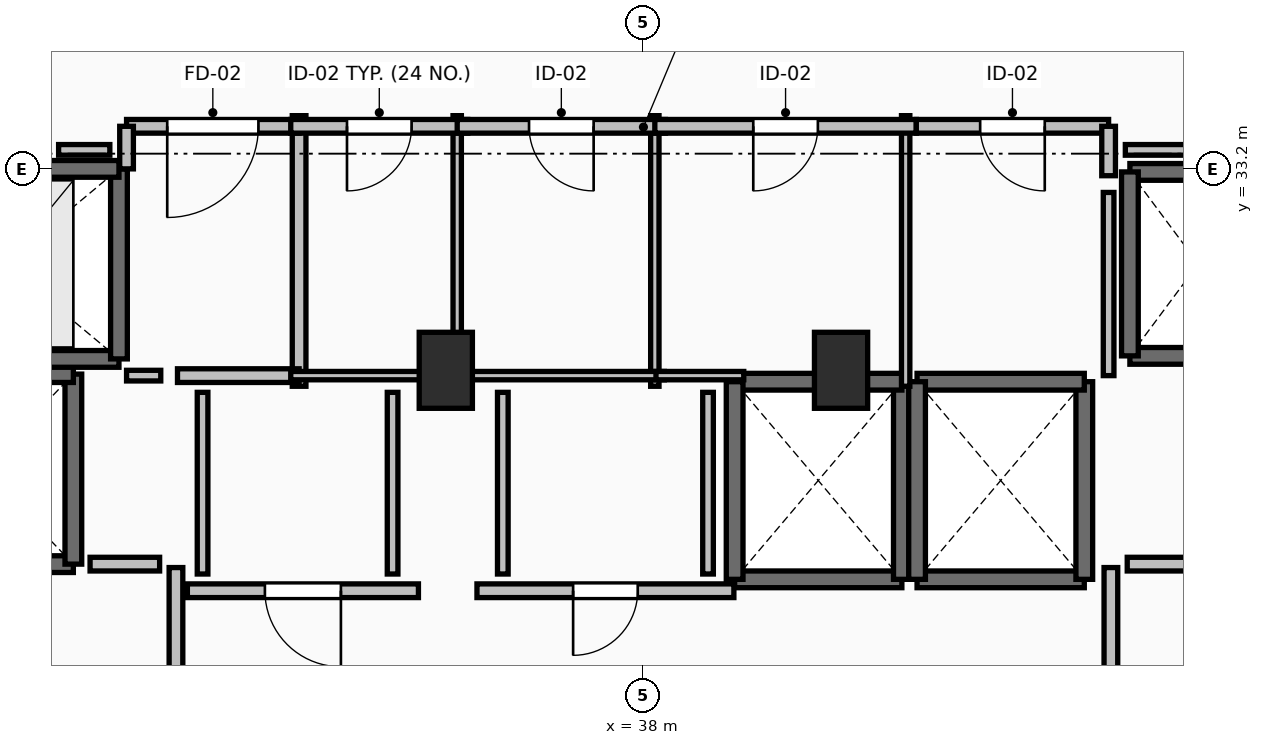
"""IFC4 building model, lengths in metres.
Left out: names, types, materials, properties, quantities, classifications, styles, units other than length and angle.
Written with IfcOpenShell. Run it as: python <this file> out.ifc"""

import sys

from ifc_helpers import new_model, si_unit, direction, frame, frame_2d, origin, origin_2d, place, context, subcontext, project, spatial, rectangle, extrude, element, fill, save


model = new_model("IFC4")
c1 = context("Model", 3, precision=1e-05, world=origin(), true_north=direction((0.0, 1.0)))
c2 = subcontext(c1, "Body", "Model", "MODEL_VIEW")
j1 = project(units=[si_unit("LENGTHUNIT", "METRE"), si_unit("PLANEANGLEUNIT", "RADIAN")], contexts=[c1])
p1 = place(None, origin())
s1 = spatial("IfcSite", under=j1, at=p1, CompositionType="ELEMENT")
p2 = place(p1, origin())
s2 = spatial("IfcBuilding", under=s1, at=p2, CompositionType="ELEMENT")
p3 = place(p2, frame((0.0, 0.0, 189.6)))
s3 = spatial("IfcBuildingStorey", under=s2, at=p3, CompositionType="ELEMENT", Elevation=189.6)
for number, where, z_axis, x_axis in (
    (1, (35.4, 30.55, 0.0), (0.0, 0.0, 1.0), (1.0, 0.0, 0.0)),
    (2, (40.6, 30.55, 0.0), (0.0, 0.0, 1.0), (1.0, 0.0, 0.0)),
):
    element("IfcColumn", number, at=place(p3, frame(where, z_axis=z_axis, x_axis=x_axis)), inside=s3, PredefinedType="PILASTER", context=c2, shape_type="SweptSolid", body=[
        extrude(rectangle(XDim=0.7, YDim=1.0, at=origin_2d()), origin(), (0.0, 0.0, 1.0), 3.5),
    ])
p4 = place(p3, frame((39.2, 27.8, 0.0), z_axis=(0.0, 0.0, 1.0), x_axis=(1.0, 0.0, 0.0)))
e3 = element("IfcWall", 3, at=p4, inside=s3, PredefinedType="SOLIDWALL", context=c2, shape_type="SweptSolid", body=[
    extrude(rectangle(XDim=2.2, YDim=0.22, at=frame_2d((1.1, 0.0))), origin(), (0.0, 0.0, 1.0), 3.24),
])
p5 = place(p3, frame((41.4, 27.8, 0.0), z_axis=(0.0, 0.0, 1.0), x_axis=(0.0, 1.0, 0.0)))
e4 = element("IfcWall", 4, at=p5, inside=s3, PredefinedType="SOLIDWALL", context=c2, shape_type="SweptSolid", body=[
    extrude(rectangle(XDim=2.6, YDim=0.22, at=frame_2d((1.3, 0.0))), origin(), (0.0, 0.0, 1.0), 3.24),
])
p6 = place(p3, frame((41.4, 30.4, 0.0), z_axis=(0.0, 0.0, 1.0), x_axis=(-1.0, 0.0, 0.0)))
e5 = element("IfcWall", 5, at=p6, inside=s3, PredefinedType="SOLIDWALL", context=c2, shape_type="SweptSolid", body=[
    extrude(rectangle(XDim=2.2, YDim=0.22, at=frame_2d((1.1, 0.0))), origin(), (0.0, 0.0, 1.0), 3.24),
])
p7 = place(p3, frame((39.2, 30.4, 0.0), z_axis=(0.0, 0.0, 1.0), x_axis=(0.0, -1.0, 0.0)))
e6 = element("IfcWall", 6, at=p7, inside=s3, PredefinedType="SOLIDWALL", context=c2, shape_type="SweptSolid", body=[
    extrude(rectangle(XDim=2.6, YDim=0.22, at=frame_2d((1.3, 0.0))), origin(), (0.0, 0.0, 1.0), 3.24),
])
p8 = place(p3, frame((41.6, 27.8, 0.0), z_axis=(0.0, 0.0, 1.0), x_axis=(1.0, 0.0, 0.0)))
e7 = element("IfcWall", 7, at=p8, inside=s3, PredefinedType="SOLIDWALL", context=c2, shape_type="SweptSolid", body=[
    extrude(rectangle(XDim=2.2, YDim=0.22, at=frame_2d((1.1, 0.0))), origin(), (0.0, 0.0, 1.0), 3.24),
])
p9 = place(p3, frame((43.8, 27.8, 0.0), z_axis=(0.0, 0.0, 1.0), x_axis=(0.0, 1.0, 0.0)))
e8 = element("IfcWall", 8, at=p9, inside=s3, PredefinedType="SOLIDWALL", context=c2, shape_type="SweptSolid", body=[
    extrude(rectangle(XDim=2.6, YDim=0.22, at=frame_2d((1.3, 0.0))), origin(), (0.0, 0.0, 1.0), 3.24),
])
p10 = place(p3, frame((43.8, 30.4, 0.0), z_axis=(0.0, 0.0, 1.0), x_axis=(-1.0, 0.0, 0.0)))
e9 = element("IfcWall", 9, at=p10, inside=s3, PredefinedType="SOLIDWALL", context=c2, shape_type="SweptSolid", body=[
    extrude(rectangle(XDim=2.2, YDim=0.22, at=frame_2d((1.1, 0.0))), origin(), (0.0, 0.0, 1.0), 3.24),
])
p11 = place(p3, frame((41.6, 30.4, 0.0), z_axis=(0.0, 0.0, 1.0), x_axis=(0.0, -1.0, 0.0)))
e10 = element("IfcWall", 10, at=p11, inside=s3, PredefinedType="SOLIDWALL", context=c2, shape_type="SweptSolid", body=[
    extrude(rectangle(XDim=2.6, YDim=0.22, at=frame_2d((1.3, 0.0))), origin(), (0.0, 0.0, 1.0), 3.24),
])
for number, where, z_axis, x_axis in (
    (11, (44.4, 30.74, 0.0), (0.0, 0.0, 1.0), (1.0, 0.0, 0.0)),
    (12, (46.2, 33.16, 0.0), (0.0, 0.0, 1.0), (-1.0, 0.0, 0.0)),
):
    element("IfcWall", number, at=place(p3, frame(where, z_axis=z_axis, x_axis=x_axis)), inside=s3, PredefinedType="SOLIDWALL", context=c2, shape_type="SweptSolid", body=[
        extrude(rectangle(XDim=1.8, YDim=0.22, at=frame_2d((0.9, 0.0))), origin(), (0.0, 0.0, 1.0), 3.24),
    ])
p12 = place(p3, frame((44.4, 33.16, 0.0), z_axis=(0.0, 0.0, 1.0), x_axis=(0.0, -1.0, 0.0)))
e13 = element("IfcWall", 13, at=p12, inside=s3, PredefinedType="SOLIDWALL", context=c2, shape_type="SweptSolid", body=[
    extrude(rectangle(XDim=2.42, YDim=0.22, at=frame_2d((1.21, 0.0))), origin(), (0.0, 0.0, 1.0), 3.24),
])
p13 = place(p3, frame((28.1, 28.0, 0.0), z_axis=(0.0, 0.0, 1.0), x_axis=(1.0, 0.0, 0.0)))
e14 = element("IfcWall", 14, at=p13, inside=s3, PredefinedType="SHEAR", context=c2, shape_type="SweptSolid", body=[
    extrude(rectangle(XDim=2.4, YDim=0.22, at=frame_2d((1.2, 0.0))), origin(), (0.0, 0.0, 1.0), 3.24),
])
p14 = place(p13, frame((0.6, 0.0, 0.0)))
e15 = element("IfcOpeningElement", 15, at=p14, cuts=e14, PredefinedType="OPENING", context=c2, shape_type="SweptSolid", body=[
    extrude(rectangle(XDim=1.2, YDim=2.2, at=frame_2d((0.6, 1.1))), frame((0.0, 0.125, 0.0), z_axis=(0.0, -1.0, 0.0), x_axis=(1.0, 0.0, 0.0)), (0.0, 0.0, 1.0), 0.25),
])
p15 = place(p3, frame((30.5, 28.0, 0.0), z_axis=(0.0, 0.0, 1.0), x_axis=(0.0, 1.0, 0.0)))
e16 = element("IfcWall", 16, at=p15, inside=s3, PredefinedType="SHEAR", context=c2, shape_type="SweptSolid", body=[
    extrude(rectangle(XDim=2.5, YDim=0.22, at=frame_2d((1.25, 0.0))), origin(), (0.0, 0.0, 1.0), 3.24),
])
p16 = place(p3, frame((30.5, 30.5, 0.0), z_axis=(0.0, 0.0, 1.0), x_axis=(-1.0, 0.0, 0.0)))
e17 = element("IfcWall", 17, at=p16, inside=s3, PredefinedType="SHEAR", context=c2, shape_type="SweptSolid", body=[
    extrude(rectangle(XDim=2.4, YDim=0.22, at=frame_2d((1.2, 0.0))), origin(), (0.0, 0.0, 1.0), 3.24),
])
p17 = place(p3, frame((28.1, 30.7, 0.0), z_axis=(0.0, 0.0, 1.0), x_axis=(1.0, 0.0, 0.0)))
e18 = element("IfcWall", 18, at=p17, inside=s3, PredefinedType="SOLIDWALL", context=c2, shape_type="SweptSolid", body=[
    extrude(rectangle(XDim=3.0, YDim=0.22, at=frame_2d((1.5, 0.0))), origin(), (0.0, 0.0, 1.0), 3.24),
])
p18 = place(p3, frame((31.1, 30.7, 0.0), z_axis=(0.0, 0.0, 1.0), x_axis=(0.0, 1.0, 0.0)))
e19 = element("IfcWall", 19, at=p18, inside=s3, PredefinedType="SOLIDWALL", context=c2, shape_type="SweptSolid", body=[
    extrude(rectangle(XDim=2.5, YDim=0.22, at=frame_2d((1.25, 0.0))), origin(), (0.0, 0.0, 1.0), 3.24),
])
p19 = place(p3, frame((31.1, 33.2, 0.0), z_axis=(0.0, 0.0, 1.0), x_axis=(-1.0, 0.0, 0.0)))
e20 = element("IfcWall", 20, at=p19, inside=s3, PredefinedType="SOLIDWALL", context=c2, shape_type="SweptSolid", body=[
    extrude(rectangle(XDim=3.0, YDim=0.22, at=frame_2d((1.5, 0.0))), origin(), (0.0, 0.0, 1.0), 3.24),
])
p20 = place(p19, frame((0.9, 0.0, 0.0)))
e21 = element("IfcOpeningElement", 21, at=p20, cuts=e20, PredefinedType="OPENING", context=c2, shape_type="SweptSolid", body=[
    extrude(rectangle(XDim=1.2, YDim=2.2, at=frame_2d((0.6, 1.1))), frame((0.0, 0.125, 0.0), z_axis=(0.0, -1.0, 0.0), x_axis=(1.0, 0.0, 0.0)), (0.0, 0.0, 1.0), 0.25),
])
p21 = place(p3, frame((31.85, 24.045, 0.0), z_axis=(0.0, 0.0, 1.0), x_axis=(0.0, 1.0, 0.0)))
e22 = element("IfcWall", 22, at=p21, inside=s3, PredefinedType="PARTITIONING", context=c2, shape_type="SweptSolid", body=[
    extrude(rectangle(XDim=3.91, YDim=0.18, at=frame_2d((1.955, 0.0))), origin(), (0.0, 0.0, 1.0), 3.24),
])
p22 = place(p21, frame((1.355, 0.0, 0.0)))
e23 = element("IfcOpeningElement", 23, at=p22, cuts=e22, PredefinedType="OPENING", context=c2, shape_type="SweptSolid", body=[
    extrude(rectangle(XDim=1.2, YDim=2.15, at=frame_2d((0.6, 1.075))), frame((0.0, 0.105, 0.0), z_axis=(0.0, -1.0, 0.0), x_axis=(1.0, 0.0, 0.0)), (0.0, 0.0, 1.0), 0.21),
])
p23 = place(p3, frame((44.15, 27.955, 0.0), z_axis=(0.0, 0.0, 1.0), x_axis=(0.0, -1.0, 0.0)))
e24 = element("IfcWall", 24, at=p23, inside=s3, PredefinedType="PARTITIONING", context=c2, shape_type="SweptSolid", body=[
    extrude(rectangle(XDim=3.91, YDim=0.18, at=frame_2d((1.955, 0.0))), origin(), (0.0, 0.0, 1.0), 3.24),
])
p24 = place(p23, frame((1.355, 0.0, 0.0)))
e25 = element("IfcOpeningElement", 25, at=p24, cuts=e24, PredefinedType="OPENING", context=c2, shape_type="SweptSolid", body=[
    extrude(rectangle(XDim=1.2, YDim=2.15, at=frame_2d((0.6, 1.075))), frame((0.0, 0.105, 0.0), z_axis=(0.0, -1.0, 0.0), x_axis=(1.0, 0.0, 0.0)), (0.0, 0.0, 1.0), 0.21),
])
p25 = place(p3, frame((33.47, 30.34, 0.0), z_axis=(0.0, 0.0, 1.0), x_axis=(0.0, 1.0, 0.0)))
e26 = element("IfcWall", 26, at=p25, inside=s3, PredefinedType="PARTITIONING", context=c2, shape_type="SweptSolid", body=[
    extrude(rectangle(XDim=3.56, YDim=0.18, at=frame_2d((1.78, 0.0))), origin(), (0.0, 0.0, 1.0), 3.24),
])
p26 = place(p3, frame((31.87, 30.48, 0.0), z_axis=(0.0, 0.0, 1.0), x_axis=(1.0, 0.0, 0.0)))
e27 = element("IfcWall", 27, at=p26, inside=s3, PredefinedType="PARTITIONING", context=c2, shape_type="SweptSolid", body=[
    extrude(rectangle(XDim=1.6, YDim=0.18, at=frame_2d((0.8, 0.0))), origin(), (0.0, 0.0, 1.0), 3.24),
])
p27 = place(p3, frame((33.47, 33.76, 0.0), z_axis=(0.0, 0.0, 1.0), x_axis=(-1.0, 0.0, 0.0)))
e28 = element("IfcWall", 28, at=p27, inside=s3, PredefinedType="PARTITIONING", context=c2, shape_type="SweptSolid", body=[
    extrude(rectangle(XDim=2.27, YDim=0.18, at=frame_2d((1.135, 0.0))), origin(), (0.0, 0.0, 1.0), 3.24),
])
p28 = place(p27, frame((0.535, 0.0, 0.0)))
e29 = element("IfcOpeningElement", 29, at=p28, cuts=e28, PredefinedType="OPENING", context=c2, shape_type="SweptSolid", body=[
    extrude(rectangle(XDim=1.2, YDim=2.15, at=frame_2d((0.6, 1.075))), frame((0.0, 0.105, 0.0), z_axis=(0.0, -1.0, 0.0), x_axis=(1.0, 0.0, 0.0)), (0.0, 0.0, 1.0), 0.21),
])
p29 = place(p3, frame((31.2, 33.76, 0.0), z_axis=(0.0, 0.0, 1.0), x_axis=(0.0, -1.0, 0.0)))
e30 = element("IfcWall", 30, at=p29, inside=s3, PredefinedType="PARTITIONING", context=c2, shape_type="SweptSolid", body=[
    extrude(rectangle(XDim=0.56, YDim=0.18, at=frame_2d((0.28, 0.0))), origin(), (0.0, 0.0, 1.0), 3.24),
])
p30 = place(p3, frame((35.04, 27.65, 0.0), z_axis=(0.0, 0.0, 1.0), x_axis=(-1.0, 0.0, 0.0)))
e31 = element("IfcWall", 31, at=p30, inside=s3, PredefinedType="PARTITIONING", context=c2, shape_type="SweptSolid", body=[
    extrude(rectangle(XDim=3.04, YDim=0.18, at=frame_2d((1.52, 0.0))), origin(), (0.0, 0.0, 1.0), 3.24),
])
p31 = place(p30, frame((1.02, 0.0, 0.0)))
e32 = element("IfcOpeningElement", 32, at=p31, cuts=e31, PredefinedType="OPENING", context=c2, shape_type="SweptSolid", body=[
    extrude(rectangle(XDim=1.0, YDim=2.15, at=frame_2d((0.5, 1.075))), frame((0.0, 0.105, 0.0), z_axis=(0.0, -1.0, 0.0), x_axis=(1.0, 0.0, 0.0)), (0.0, 0.0, 1.0), 0.21),
])
p32 = place(p3, frame((39.19, 27.65, 0.0), z_axis=(0.0, 0.0, 1.0), x_axis=(-1.0, 0.0, 0.0)))
e33 = element("IfcWall", 33, at=p32, inside=s3, PredefinedType="PARTITIONING", context=c2, shape_type="SweptSolid", body=[
    extrude(rectangle(XDim=3.38, YDim=0.18, at=frame_2d((1.69, 0.0))), origin(), (0.0, 0.0, 1.0), 3.24),
])
p33 = place(p32, frame((1.265, 0.0, 0.0)))
e34 = element("IfcOpeningElement", 34, at=p33, cuts=e33, PredefinedType="OPENING", context=c2, shape_type="SweptSolid", body=[
    extrude(rectangle(XDim=0.85, YDim=2.1, at=frame_2d((0.425, 1.05))), frame((0.0, 0.105, 0.0), z_axis=(0.0, -1.0, 0.0), x_axis=(1.0, 0.0, 0.0)), (0.0, 0.0, 1.0), 0.21),
])
p34 = place(p3, frame((35.55, 30.34, 0.0), z_axis=(0.0, 0.0, 1.0), x_axis=(0.0, 1.0, 0.0)))
e35 = element("IfcWall", 35, at=p34, inside=s3, PredefinedType="PARTITIONING", context=c2, shape_type="SweptSolid", body=[
    extrude(rectangle(XDim=3.56, YDim=0.11, at=frame_2d((1.78, 0.0))), origin(), (0.0, 0.0, 1.0), 2.432),
])
p35 = place(p3, frame((33.36, 30.48, 0.0), z_axis=(0.0, 0.0, 1.0), x_axis=(1.0, 0.0, 0.0)))
e36 = element("IfcWall", 36, at=p35, inside=s3, PredefinedType="PARTITIONING", context=c2, shape_type="SweptSolid", body=[
    extrude(rectangle(XDim=1.81, YDim=0.11, at=frame_2d((0.905, 0.0))), origin(), (0.0, 0.0, 1.0), 3.24),
])
p36 = place(p3, frame((35.69, 33.76, 0.0), z_axis=(0.0, 0.0, 1.0), x_axis=(-1.0, 0.0, 0.0)))
e37 = element("IfcWall", 37, at=p36, inside=s3, PredefinedType="PARTITIONING", context=c2, shape_type="SweptSolid", body=[
    extrude(rectangle(XDim=2.33, YDim=0.18, at=frame_2d((1.165, 0.0))), origin(), (0.0, 0.0, 1.0), 3.24),
])
p37 = place(p36, frame((0.74, 0.0, 0.0)))
e38 = element("IfcOpeningElement", 38, at=p37, cuts=e37, PredefinedType="OPENING", context=c2, shape_type="SweptSolid", body=[
    extrude(rectangle(XDim=0.85, YDim=2.1, at=frame_2d((0.425, 1.05))), frame((0.0, 0.105, 0.0), z_axis=(0.0, -1.0, 0.0), x_axis=(1.0, 0.0, 0.0)), (0.0, 0.0, 1.0), 0.21),
])
p38 = place(p3, frame((38.15, 30.34, 0.0), z_axis=(0.0, 0.0, 1.0), x_axis=(0.0, 1.0, 0.0)))
e39 = element("IfcWall", 39, at=p38, inside=s3, PredefinedType="PARTITIONING", context=c2, shape_type="SweptSolid", body=[
    extrude(rectangle(XDim=3.56, YDim=0.11, at=frame_2d((1.78, 0.0))), origin(), (0.0, 0.0, 1.0), 2.432),
])
p39 = place(p3, frame((35.68, 30.48, 0.0), z_axis=(0.0, 0.0, 1.0), x_axis=(1.0, 0.0, 0.0)))
e40 = element("IfcWall", 40, at=p39, inside=s3, PredefinedType="PARTITIONING", context=c2, shape_type="SweptSolid", body=[
    extrude(rectangle(XDim=2.595, YDim=0.11, at=frame_2d((1.297, 0.0))), origin(), (0.0, 0.0, 1.0), 2.432),
])
p40 = place(p3, frame((38.29, 33.76, 0.0), z_axis=(0.0, 0.0, 1.0), x_axis=(-1.0, 0.0, 0.0)))
e41 = element("IfcWall", 41, at=p40, inside=s3, PredefinedType="PARTITIONING", context=c2, shape_type="SweptSolid", body=[
    extrude(rectangle(XDim=2.74, YDim=0.18, at=frame_2d((1.37, 0.0))), origin(), (0.0, 0.0, 1.0), 3.24),
])
p41 = place(p40, frame((0.945, 0.0, 0.0)))
e42 = element("IfcOpeningElement", 42, at=p41, cuts=e41, PredefinedType="OPENING", context=c2, shape_type="SweptSolid", body=[
    extrude(rectangle(XDim=0.85, YDim=2.1, at=frame_2d((0.425, 1.05))), frame((0.0, 0.105, 0.0), z_axis=(0.0, -1.0, 0.0), x_axis=(1.0, 0.0, 0.0)), (0.0, 0.0, 1.0), 0.21),
])
p42 = place(p3, frame((41.45, 30.34, 0.0), z_axis=(0.0, 0.0, 1.0), x_axis=(0.0, 1.0, 0.0)))
e43 = element("IfcWall", 43, at=p42, inside=s3, PredefinedType="PARTITIONING", context=c2, shape_type="SweptSolid", body=[
    extrude(rectangle(XDim=3.56, YDim=0.11, at=frame_2d((1.78, 0.0))), origin(), (0.0, 0.0, 1.0), 3.24),
])
p43 = place(p3, frame((38.165, 30.48, 0.0), z_axis=(0.0, 0.0, 1.0), x_axis=(1.0, 0.0, 0.0)))
e44 = element("IfcWall", 44, at=p43, inside=s3, PredefinedType="PARTITIONING", context=c2, shape_type="SweptSolid", body=[
    extrude(rectangle(XDim=1.155, YDim=0.11, at=frame_2d((0.578, 0.0))), origin(), (0.0, 0.0, 1.0), 2.432),
])
p44 = place(p3, frame((41.59, 33.76, 0.0), z_axis=(0.0, 0.0, 1.0), x_axis=(-1.0, 0.0, 0.0)))
e45 = element("IfcWall", 45, at=p44, inside=s3, PredefinedType="PARTITIONING", context=c2, shape_type="SweptSolid", body=[
    extrude(rectangle(XDim=3.44, YDim=0.18, at=frame_2d((1.72, 0.0))), origin(), (0.0, 0.0, 1.0), 3.24),
])
p45 = place(p44, frame((1.295, 0.0, 0.0)))
e46 = element("IfcOpeningElement", 46, at=p45, cuts=e45, PredefinedType="OPENING", context=c2, shape_type="SweptSolid", body=[
    extrude(rectangle(XDim=0.85, YDim=2.1, at=frame_2d((0.425, 1.05))), frame((0.0, 0.105, 0.0), z_axis=(0.0, -1.0, 0.0), x_axis=(1.0, 0.0, 0.0)), (0.0, 0.0, 1.0), 0.21),
])
p46 = place(p3, frame((44.12, 33.76, 0.0), z_axis=(0.0, 0.0, 1.0), x_axis=(-1.0, 0.0, 0.0)))
e47 = element("IfcWall", 47, at=p46, inside=s3, PredefinedType="PARTITIONING", context=c2, shape_type="SweptSolid", body=[
    extrude(rectangle(XDim=2.53, YDim=0.18, at=frame_2d((1.265, 0.0))), origin(), (0.0, 0.0, 1.0), 3.24),
])
p47 = place(p46, frame((0.84, 0.0, 0.0)))
e48 = element("IfcOpeningElement", 48, at=p47, cuts=e47, PredefinedType="OPENING", context=c2, shape_type="SweptSolid", body=[
    extrude(rectangle(XDim=0.85, YDim=2.1, at=frame_2d((0.425, 1.05))), frame((0.0, 0.105, 0.0), z_axis=(0.0, -1.0, 0.0), x_axis=(1.0, 0.0, 0.0)), (0.0, 0.0, 1.0), 0.21),
])
p48 = place(p3, frame((44.12, 33.11, 0.0), z_axis=(0.0, 0.0, 1.0), x_axis=(0.0, 1.0, 0.0)))
e49 = element("IfcWall", 49, at=p48, inside=s3, PredefinedType="PARTITIONING", context=c2, shape_type="SweptSolid", body=[
    extrude(rectangle(XDim=0.65, YDim=0.18, at=frame_2d((0.325, 0.0))), origin(), (0.0, 0.0, 1.0), 3.24),
])
for number, where, z_axis, x_axis in (
    (50, (31.635, 28.0, 0.0), (0.0, 0.0, 1.0), (-1.0, 0.0, 0.0)),
    (51, (45.28, 28.0, 0.0), (0.0, 0.0, 1.0), (-1.0, 0.0, 0.0)),
):
    element("IfcWall", number, at=place(p3, frame(where, z_axis=z_axis, x_axis=x_axis)), inside=s3, PredefinedType="PARTITIONING", context=c2, shape_type="SweptSolid", body=[
        extrude(rectangle(XDim=0.915, YDim=0.18, at=frame_2d((0.458, 0.0))), origin(), (0.0, 0.0, 1.0), 3.24),
    ])
p49 = place(p3, frame((31.2, 30.48, 0.0), z_axis=(0.0, 0.0, 1.0), x_axis=(1.0, 0.0, 0.0)))
e52 = element("IfcWall", 52, at=p49, inside=s3, PredefinedType="PARTITIONING", context=c2, shape_type="SweptSolid", body=[
    extrude(rectangle(XDim=0.45, YDim=0.14, at=frame_2d((0.225, 0.0))), origin(), (0.0, 0.0, 1.0), 3.24),
])
p50 = place(p3, frame((44.12, 30.48, 0.0), z_axis=(0.0, 0.0, 1.0), x_axis=(0.0, 1.0, 0.0)))
e53 = element("IfcWall", 53, at=p50, inside=s3, PredefinedType="PARTITIONING", context=c2, shape_type="SweptSolid", body=[
    extrude(rectangle(XDim=2.41, YDim=0.14, at=frame_2d((1.205, 0.0))), origin(), (0.0, 0.0, 1.0), 3.24),
])
for number, where, z_axis, x_axis in (
    (54, (32.2, 30.26, 0.0), (0.0, 0.0, 1.0), (0.0, -1.0, 0.0)),
    (55, (34.7, 27.87, 0.0), (0.0, 0.0, 1.0), (0.0, 1.0, 0.0)),
    (56, (36.15, 30.26, 0.0), (0.0, 0.0, 1.0), (0.0, -1.0, 0.0)),
    (57, (38.85, 27.87, 0.0), (0.0, 0.0, 1.0), (0.0, 1.0, 0.0)),
):
    element("IfcWall", number, at=place(p3, frame(where, z_axis=z_axis, x_axis=x_axis)), inside=s3, PredefinedType="PARTITIONING", context=c2, shape_type="SweptSolid", body=[
        extrude(rectangle(XDim=2.39, YDim=0.14, at=frame_2d((1.195, 0.0))), origin(), (0.0, 0.0, 1.0), 3.24),
    ])
p51 = place(p3, frame((48.55, 33.45, 0.0), z_axis=(0.0, 0.0, 1.0), x_axis=(-1.0, 0.0, 0.0)))
e58 = element("IfcWall", 58, at=p51, inside=s3, PredefinedType="PARTITIONING", context=c2, shape_type="SweptSolid", body=[
    extrude(rectangle(XDim=4.21, YDim=0.14, at=frame_2d((2.105, 0.0))), origin(), (0.0, 0.0, 1.0), 2.432),
])
p52 = place(p3, frame((30.98, 33.45, 0.0), z_axis=(0.0, 0.0, 1.0), x_axis=(-1.0, 0.0, 0.0)))
e59 = element("IfcWall", 59, at=p52, inside=s3, PredefinedType="PARTITIONING", context=c2, shape_type="SweptSolid", body=[
    extrude(rectangle(XDim=0.674, YDim=0.14, at=frame_2d((0.337, 0.0))), origin(), (0.0, 0.0, 1.0), 3.24),
])
p53 = place(p28, origin())
e60 = element("IfcDoor", 60, at=p53, inside=s3, OperationType="SINGLE_SWING_RIGHT", PredefinedType="DOOR", context=c2, shape_type="SweptSolid", body=[
    extrude(rectangle(XDim=1.2, YDim=2.15, at=frame_2d((0.6, 1.075))), frame((0.0, 0.025, 0.0), z_axis=(0.0, -1.0, 0.0), x_axis=(1.0, 0.0, 0.0)), (0.0, 0.0, 1.0), 0.05),
])
fill(e29, e60)
p54 = place(p31, origin())
e61 = element("IfcDoor", 61, at=p54, inside=s3, OperationType="SINGLE_SWING_LEFT", PredefinedType="DOOR", context=c2, shape_type="SweptSolid", body=[
    extrude(rectangle(XDim=1.0, YDim=2.15, at=frame_2d((0.5, 1.075))), frame((0.0, 0.025, 0.0), z_axis=(0.0, -1.0, 0.0), x_axis=(1.0, 0.0, 0.0)), (0.0, 0.0, 1.0), 0.05),
])
fill(e32, e61)
p55 = place(p33, origin())
e62 = element("IfcDoor", 62, at=p55, inside=s3, OperationType="SINGLE_SWING_RIGHT", PredefinedType="DOOR", context=c2, shape_type="SweptSolid", body=[
    extrude(rectangle(XDim=0.85, YDim=2.1, at=frame_2d((0.425, 1.05))), frame((0.0, 0.025, 0.0), z_axis=(0.0, -1.0, 0.0), x_axis=(1.0, 0.0, 0.0)), (0.0, 0.0, 1.0), 0.05),
])
fill(e34, e62)
p56 = place(p37, origin())
e63 = element("IfcDoor", 63, at=p56, inside=s3, OperationType="SINGLE_SWING_RIGHT", PredefinedType="DOOR", context=c2, shape_type="SweptSolid", body=[
    extrude(rectangle(XDim=0.85, YDim=2.1, at=frame_2d((0.425, 1.05))), frame((0.0, 0.025, 0.0), z_axis=(0.0, -1.0, 0.0), x_axis=(1.0, 0.0, 0.0)), (0.0, 0.0, 1.0), 0.05),
])
fill(e38, e63)
p57 = place(p41, origin())
e64 = element("IfcDoor", 64, at=p57, inside=s3, OperationType="SINGLE_SWING_LEFT", PredefinedType="DOOR", context=c2, shape_type="SweptSolid", body=[
    extrude(rectangle(XDim=0.85, YDim=2.1, at=frame_2d((0.425, 1.05))), frame((0.0, 0.025, 0.0), z_axis=(0.0, -1.0, 0.0), x_axis=(1.0, 0.0, 0.0)), (0.0, 0.0, 1.0), 0.05),
])
fill(e42, e64)
p58 = place(p45, origin())
e65 = element("IfcDoor", 65, at=p58, inside=s3, OperationType="SINGLE_SWING_RIGHT", PredefinedType="DOOR", context=c2, shape_type="SweptSolid", body=[
    extrude(rectangle(XDim=0.85, YDim=2.1, at=frame_2d((0.425, 1.05))), frame((0.0, 0.025, 0.0), z_axis=(0.0, -1.0, 0.0), x_axis=(1.0, 0.0, 0.0)), (0.0, 0.0, 1.0), 0.05),
])
fill(e46, e65)
p59 = place(p47, origin())
e66 = element("IfcDoor", 66, at=p59, inside=s3, OperationType="SINGLE_SWING_LEFT", PredefinedType="DOOR", context=c2, shape_type="SweptSolid", body=[
    extrude(rectangle(XDim=0.85, YDim=2.1, at=frame_2d((0.425, 1.05))), frame((0.0, 0.025, 0.0), z_axis=(0.0, -1.0, 0.0), x_axis=(1.0, 0.0, 0.0)), (0.0, 0.0, 1.0), 0.05),
])
fill(e48, e66)
save(model, sys.argv[1])
